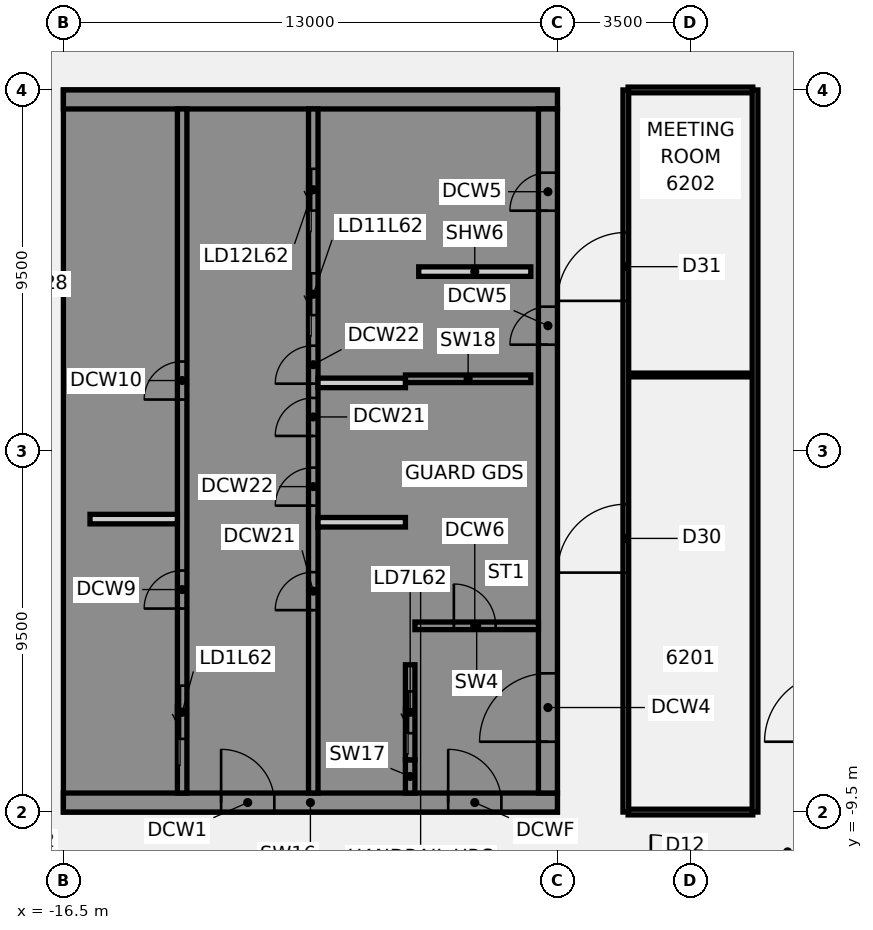
"""IFC4 building model, lengths in metres.
Left out: names, types, materials, properties, quantities, classifications, styles, units other than length and angle.
Written with IfcOpenShell. Run it as: python <this file> out.ifc"""

import sys

from ifc_helpers import new_model, si_unit, direction, frame, frame_2d, origin, place, context, subcontext, project, spatial, polyline, rectangle, outline, extrude, element, fill, save


model = new_model("IFC4")
c1 = context("Model", 3, precision=1e-05, world=origin(), true_north=direction((0.0, 1.0)))
c2 = subcontext(c1, "Body", "Model", "MODEL_VIEW")
j1 = project(units=[si_unit("LENGTHUNIT", "METRE"), si_unit("PLANEANGLEUNIT", "RADIAN")], contexts=[c1])
p1 = place(None, origin())
s1 = spatial("IfcSite", under=j1, at=p1, CompositionType="ELEMENT")
p2 = place(p1, origin())
s2 = spatial("IfcBuilding", under=s1, at=p2, CompositionType="ELEMENT")
p3 = place(p2, frame((0.0, 0.0, 245.1)))
s3 = spatial("IfcBuildingStorey", under=s2, at=p3, CompositionType="ELEMENT", Elevation=245.1)
p4 = place(p3, frame((-1.64, -9.5, 0.0), z_axis=(0.0, 0.0, 1.0), x_axis=(1.0, 0.0, 0.0)))
e1 = element("IfcWall", 1, at=p4, inside=s3, PredefinedType="PARTITIONING", context=c2, shape_type="SweptSolid", body=[
    extrude(rectangle(XDim=3.28, YDim=0.15, at=frame_2d((1.64, 0.0))), origin(), (0.0, 0.0, 1.0), 2.864),
])
p5 = place(p3, frame((-1.64, 2.0, 0.0), z_axis=(0.0, 0.0, 1.0), x_axis=(1.0, 0.0, 0.0)))
e2 = element("IfcWall", 2, at=p5, inside=s3, PredefinedType="PARTITIONING", context=c2, shape_type="SweptSolid", body=[
    extrude(rectangle(XDim=3.28, YDim=0.1, at=frame_2d((1.64, 0.0))), origin(), (0.0, 0.0, 1.0), 2.864),
])
p6 = place(p3, frame((-1.64, 9.5, 0.0), z_axis=(0.0, 0.0, 1.0), x_axis=(1.0, 0.0, 0.0)))
e3 = element("IfcWall", 3, at=p6, inside=s3, PredefinedType="PARTITIONING", context=c2, shape_type="SweptSolid", body=[
    extrude(rectangle(XDim=3.28, YDim=0.15, at=frame_2d((1.64, 0.0))), origin(), (0.0, 0.0, 1.0), 2.864),
])
p7 = place(p3, frame((-1.7, -9.5, 0.0), z_axis=(0.0, 0.0, 1.0), x_axis=(0.0, 1.0, 0.0)))
e4 = element("IfcWall", 4, at=p7, inside=s3, PredefinedType="PARTITIONING", context=c2, shape_type="SweptSolid", body=[
    extrude(rectangle(XDim=19.0, YDim=0.15, at=frame_2d((9.5, 0.0))), origin(), (0.0, 0.0, 1.0), 2.864),
])
p8 = place(p7, frame((6.3, 0.0, 0.0)))
e5 = element("IfcOpeningElement", 5, at=p8, cuts=e4, PredefinedType="OPENING", context=c2, shape_type="SweptSolid", body=[
    extrude(rectangle(XDim=1.8, YDim=2.1, at=frame_2d((0.9, 1.05))), frame((0.0, 0.085, 0.0), z_axis=(0.0, -1.0, 0.0), x_axis=(1.0, 0.0, 0.0)), (0.0, 0.0, 1.0), 0.17),
])
p9 = place(p7, frame((13.45, 0.0, 0.0)))
e6 = element("IfcOpeningElement", 6, at=p9, cuts=e4, PredefinedType="OPENING", context=c2, shape_type="SweptSolid", body=[
    extrude(rectangle(XDim=1.8, YDim=2.1, at=frame_2d((0.9, 1.05))), frame((0.0, 0.085, 0.0), z_axis=(0.0, -1.0, 0.0), x_axis=(1.0, 0.0, 0.0)), (0.0, 0.0, 1.0), 0.17),
])
p10 = place(p3, frame((1.7, -9.5, 0.0), z_axis=(0.0, 0.0, 1.0), x_axis=(0.0, 1.0, 0.0)))
e7 = element("IfcWall", 7, at=p10, inside=s3, PredefinedType="PARTITIONING", context=c2, shape_type="SweptSolid", body=[
    extrude(rectangle(XDim=19.0, YDim=0.15, at=frame_2d((9.5, 0.0))), origin(), (0.0, 0.0, 1.0), 2.864),
])
p11 = place(p3, frame((-16.5, -9.25, 0.0), z_axis=(0.0, 0.0, 1.0), x_axis=(1.0, 0.0, 0.0)))
e8 = element("IfcWall", 8, at=p11, inside=s3, PredefinedType="SHEAR", context=c2, shape_type="SweptSolid", body=[
    extrude(rectangle(XDim=13.0, YDim=0.5, at=frame_2d((6.5, 0.0))), origin(), (0.0, 0.0, 1.0), 3.46),
])
p12 = place(p11, frame((4.15, 0.0, 0.0)))
e9 = element("IfcOpeningElement", 9, at=p12, cuts=e8, PredefinedType="OPENING", context=c2, shape_type="SweptSolid", body=[
    extrude(rectangle(XDim=1.4, YDim=2.1, at=frame_2d((0.7, 1.05))), frame((0.0, 0.26, 0.0), z_axis=(0.0, -1.0, 0.0), x_axis=(1.0, 0.0, 0.0)), (0.0, 0.0, 1.0), 0.52),
])
p13 = place(p11, frame((10.125, 0.0, 0.0)))
e10 = element("IfcOpeningElement", 10, at=p13, cuts=e8, PredefinedType="OPENING", context=c2, shape_type="SweptSolid", body=[
    extrude(rectangle(XDim=1.4, YDim=2.1, at=frame_2d((0.7, 1.05))), frame((0.0, 0.26, 0.0), z_axis=(0.0, -1.0, 0.0), x_axis=(1.0, 0.0, 0.0)), (0.0, 0.0, 1.0), 0.52),
])
p14 = place(p3, origin())
e11 = element("IfcWall", 11, at=p14, inside=s3, PredefinedType="SHEAR", context=c2, shape_type="SweptSolid", body=[
    extrude(outline(polyline([(-13.5, -8.125), (-16.0, -8.125), (-16.0, -5.625), (-13.5, -5.625), (-13.5, -5.375), (-16.0, -5.375), (-16.0, 5.375), (-13.5, 5.375), (-13.5, 5.625), (-16.0, 5.625), (-16.0, 8.125), (-13.5, 8.125), (-13.5, 9.0), (-16.0, 9.0), (-16.5, 9.0), (-16.5, -9.0), (-16.0, -9.0), (-13.5, -9.0), (-13.5, -8.125)])), origin(), (0.0, 0.0, 1.0), 3.46),
])
p15 = place(p3, frame((-16.5, 9.25, 0.0), z_axis=(0.0, 0.0, 1.0), x_axis=(1.0, 0.0, 0.0)))
e12 = element("IfcWall", 12, at=p15, inside=s3, PredefinedType="SHEAR", context=c2, shape_type="SweptSolid", body=[
    extrude(rectangle(XDim=13.0, YDim=0.5, at=frame_2d((6.5, 0.0))), origin(), (0.0, 0.0, 1.0), 3.46),
])
p16 = place(p3, origin())
e13 = element("IfcWall", 13, at=p16, inside=s3, PredefinedType="SHEAR", context=c2, shape_type="SweptSolid", body=[
    extrude(outline(polyline([(-9.8, -5.375), (-9.8, -5.625), (-7.5, -5.625), (-7.25, -5.625), (-7.25, 9.0), (-7.5, 9.0), (-9.8, 9.0), (-9.8, 8.125), (-7.5, 8.125), (-7.5, 5.625), (-9.8, 5.625), (-9.8, 5.375), (-7.5, 5.375), (-7.5, 2.875), (-9.8, 2.875), (-9.8, 2.625), (-7.5, 2.625), (-7.5, -5.375), (-9.8, -5.375)])), origin(), (0.0, 0.0, 1.0), 3.46),
])
p17 = place(p3, origin())
e14 = element("IfcWall", 14, at=p17, inside=s3, PredefinedType="SHEAR", context=c2, shape_type="SweptSolid", body=[
    extrude(outline(polyline([(-7.5, -8.125), (-9.55, -8.125), (-9.55, -5.625), (-9.8, -5.625), (-9.8, -8.125), (-9.8, -9.0), (-7.5, -9.0), (-7.5, -8.125)])), origin(), (0.0, 0.0, 1.0), 3.46),
])
p18 = place(p3, frame((-7.375, -9.0, 0.0), z_axis=(0.0, 0.0, 1.0), x_axis=(0.0, 1.0, 0.0)))
e15 = element("IfcWall", 15, at=p18, inside=s3, PredefinedType="SHEAR", context=c2, shape_type="SweptSolid", body=[
    extrude(rectangle(XDim=0.875, YDim=0.25, at=frame_2d((0.438, 0.0))), origin(), (0.0, 0.0, 1.0), 3.46),
])
p19 = place(p3, frame((-7.5, 1.9, 0.0), z_axis=(0.0, 0.0, 1.0), x_axis=(1.0, 0.0, 0.0)))
e16 = element("IfcWall", 16, at=p19, inside=s3, PredefinedType="SHEAR", context=c2, shape_type="SweptSolid", body=[
    extrude(rectangle(XDim=3.3, YDim=0.2, at=frame_2d((1.65, 0.0))), origin(), (0.0, 0.0, 1.0), 3.46),
])
p20 = place(p3, frame((-13.375, -9.0, 0.0), z_axis=(0.0, 0.0, 1.0), x_axis=(0.0, 1.0, 0.0)))
e17 = element("IfcWall", 17, at=p20, inside=s3, PredefinedType="SHEAR", context=c2, shape_type="SweptSolid", body=[
    extrude(rectangle(XDim=18.0, YDim=0.25, at=frame_2d((9.0, 0.0))), origin(), (0.0, 0.0, 1.0), 3.46),
])
p21 = place(p20, frame((1.425, 0.0, 0.0)))
e18 = element("IfcOpeningElement", 18, at=p21, cuts=e17, PredefinedType="OPENING", context=c2, shape_type="SweptSolid", body=[
    extrude(rectangle(XDim=1.4, YDim=2.1, at=frame_2d((0.7, 1.05))), frame((0.0, 0.135, 0.0), z_axis=(0.0, -1.0, 0.0), x_axis=(1.0, 0.0, 0.0)), (0.0, 0.0, 1.0), 0.27),
])
p22 = place(p20, frame((4.854, 0.0, 0.0)))
e19 = element("IfcOpeningElement", 19, at=p22, cuts=e17, PredefinedType="OPENING", context=c2, shape_type="SweptSolid", body=[
    extrude(rectangle(XDim=1.0, YDim=2.1, at=frame_2d((0.5, 1.05))), frame((0.0, 0.135, 0.0), z_axis=(0.0, -1.0, 0.0), x_axis=(1.0, 0.0, 0.0)), (0.0, 0.0, 1.0), 0.27),
])
p23 = place(p20, frame((10.354, 0.0, 0.0)))
e20 = element("IfcOpeningElement", 20, at=p23, cuts=e17, PredefinedType="OPENING", context=c2, shape_type="SweptSolid", body=[
    extrude(rectangle(XDim=1.0, YDim=2.1, at=frame_2d((0.5, 1.05))), frame((0.0, 0.135, 0.0), z_axis=(0.0, -1.0, 0.0), x_axis=(1.0, 0.0, 0.0)), (0.0, 0.0, 1.0), 0.27),
])
p24 = place(p3, frame((-9.925, -9.0, 0.0), z_axis=(0.0, 0.0, 1.0), x_axis=(0.0, 1.0, 0.0)))
e21 = element("IfcWall", 21, at=p24, inside=s3, PredefinedType="SHEAR", context=c2, shape_type="SweptSolid", body=[
    extrude(rectangle(XDim=18.0, YDim=0.25, at=frame_2d((9.0, 0.0))), origin(), (0.0, 0.0, 1.0), 3.46),
])
p25 = place(p24, frame((12.575, 0.0, 0.0)))
e22 = element("IfcOpeningElement", 22, at=p25, cuts=e21, PredefinedType="OPENING", context=c2, shape_type="SweptSolid", body=[
    extrude(rectangle(XDim=1.1, YDim=2.1, at=frame_2d((0.55, 1.05))), frame((0.0, 0.135, 0.0), z_axis=(0.0, -1.0, 0.0), x_axis=(1.0, 0.0, 0.0)), (0.0, 0.0, 1.0), 0.27),
])
p26 = place(p24, frame((15.325, 0.0, 0.0)))
e23 = element("IfcOpeningElement", 23, at=p26, cuts=e21, PredefinedType="OPENING", context=c2, shape_type="SweptSolid", body=[
    extrude(rectangle(XDim=1.1, YDim=2.1, at=frame_2d((0.55, 1.05))), frame((0.0, 0.135, 0.0), z_axis=(0.0, -1.0, 0.0), x_axis=(1.0, 0.0, 0.0)), (0.0, 0.0, 1.0), 0.27),
])
p27 = place(p24, frame((4.812, 0.0, 0.0)))
e24 = element("IfcOpeningElement", 24, at=p27, cuts=e21, PredefinedType="OPENING", context=c2, shape_type="SweptSolid", body=[
    extrude(rectangle(XDim=1.0, YDim=2.1, at=frame_2d((0.5, 1.05))), frame((0.0, 0.135, 0.0), z_axis=(0.0, -1.0, 0.0), x_axis=(1.0, 0.0, 0.0)), (0.0, 0.0, 1.0), 0.27),
])
p28 = place(p24, frame((7.562, 0.0, 0.0)))
e25 = element("IfcOpeningElement", 25, at=p28, cuts=e21, PredefinedType="OPENING", context=c2, shape_type="SweptSolid", body=[
    extrude(rectangle(XDim=1.0, YDim=2.1, at=frame_2d((0.5, 1.05))), frame((0.0, 0.135, 0.0), z_axis=(0.0, -1.0, 0.0), x_axis=(1.0, 0.0, 0.0)), (0.0, 0.0, 1.0), 0.27),
])
p29 = place(p24, frame((9.396, 0.0, 0.0)))
e26 = element("IfcOpeningElement", 26, at=p29, cuts=e21, PredefinedType="OPENING", context=c2, shape_type="SweptSolid", body=[
    extrude(rectangle(XDim=1.0, YDim=2.1, at=frame_2d((0.5, 1.05))), frame((0.0, 0.135, 0.0), z_axis=(0.0, -1.0, 0.0), x_axis=(1.0, 0.0, 0.0)), (0.0, 0.0, 1.0), 0.27),
])
p30 = place(p24, frame((10.771, 0.0, 0.0)))
e27 = element("IfcOpeningElement", 27, at=p30, cuts=e21, PredefinedType="OPENING", context=c2, shape_type="SweptSolid", body=[
    extrude(rectangle(XDim=1.0, YDim=2.1, at=frame_2d((0.5, 1.05))), frame((0.0, 0.135, 0.0), z_axis=(0.0, -1.0, 0.0), x_axis=(1.0, 0.0, 0.0)), (0.0, 0.0, 1.0), 0.27),
])
p31 = place(p3, frame((-7.375, -8.125, 0.0), z_axis=(0.0, 0.0, 1.0), x_axis=(0.0, 1.0, 0.0)))
e28 = element("IfcWall", 28, at=p31, inside=s3, PredefinedType="SHEAR", context=c2, shape_type="SweptSolid", body=[
    extrude(rectangle(XDim=2.5, YDim=0.25, at=frame_2d((1.25, 0.0))), origin(), (0.0, 0.0, 1.0), 3.46),
])
p32 = place(p31, frame((0.7, 0.0, 0.0)))
e29 = element("IfcOpeningElement", 29, at=p32, cuts=e28, PredefinedType="OPENING", context=c2, shape_type="SweptSolid", body=[
    extrude(rectangle(XDim=1.1, YDim=2.1, at=frame_2d((0.55, 1.05))), frame((0.0, 0.135, 0.0), z_axis=(0.0, -1.0, 0.0), x_axis=(1.0, 0.0, 0.0)), (0.0, 0.0, 1.0), 0.27),
])
p33 = place(p3, frame((-3.75, -9.0, 0.0), z_axis=(0.0, 0.0, 1.0), x_axis=(0.0, 1.0, 0.0)))
e30 = element("IfcWall", 30, at=p33, inside=s3, PredefinedType="SHEAR", context=c2, shape_type="SweptSolid", body=[
    extrude(rectangle(XDim=18.0, YDim=0.5, at=frame_2d((9.0, 0.0))), origin(), (0.0, 0.0, 1.0), 3.46),
])
p34 = place(p33, frame((1.35, 0.0, 0.0)))
e31 = element("IfcOpeningElement", 31, at=p34, cuts=e30, PredefinedType="OPENING", context=c2, shape_type="SweptSolid", body=[
    extrude(rectangle(XDim=1.8, YDim=2.1, at=frame_2d((0.9, 1.05))), frame((0.0, 0.26, 0.0), z_axis=(0.0, -1.0, 0.0), x_axis=(1.0, 0.0, 0.0)), (0.0, 0.0, 1.0), 0.52),
])
p35 = place(p33, frame((11.798, 0.0, 0.0)))
e32 = element("IfcOpeningElement", 32, at=p35, cuts=e30, PredefinedType="OPENING", context=c2, shape_type="SweptSolid", body=[
    extrude(rectangle(XDim=1.0, YDim=2.1, at=frame_2d((0.5, 1.05))), frame((0.0, 0.26, 0.0), z_axis=(0.0, -1.0, 0.0), x_axis=(1.0, 0.0, 0.0)), (0.0, 0.0, 1.0), 0.52),
])
p36 = place(p33, frame((15.323, 0.0, 0.0)))
e33 = element("IfcOpeningElement", 33, at=p36, cuts=e30, PredefinedType="OPENING", context=c2, shape_type="SweptSolid", body=[
    extrude(rectangle(XDim=1.0, YDim=2.1, at=frame_2d((0.5, 1.05))), frame((0.0, 0.26, 0.0), z_axis=(0.0, -1.0, 0.0), x_axis=(1.0, 0.0, 0.0)), (0.0, 0.0, 1.0), 0.52),
])
p37 = place(p3, frame((-7.15, 4.72, 0.0), z_axis=(0.0, 0.0, 1.0), x_axis=(1.0, 0.0, 0.0)))
e34 = element("IfcWall", 34, at=p37, inside=s3, PredefinedType="PARTITIONING", context=c2, shape_type="SweptSolid", body=[
    extrude(rectangle(XDim=2.95, YDim=0.25, at=frame_2d((1.475, 0.0))), origin(), (0.0, 0.0, 1.0), 3.46),
])
p38 = place(p3, frame((-7.25, -4.6, 0.0), z_axis=(0.0, 0.0, 1.0), x_axis=(1.0, 0.0, 0.0)))
e35 = element("IfcWall", 35, at=p38, inside=s3, PredefinedType="SHEAR", context=c2, shape_type="SweptSolid", body=[
    extrude(rectangle(XDim=3.25, YDim=0.2, at=frame_2d((1.625, 0.0))), origin(), (0.0, 0.0, 1.0), 3.46),
])
p39 = place(p38, frame((1.025, 0.0, 0.0)))
e36 = element("IfcOpeningElement", 36, at=p39, cuts=e35, PredefinedType="OPENING", context=c2, shape_type="SweptSolid", body=[
    extrude(rectangle(XDim=1.1, YDim=2.1, at=frame_2d((0.55, 1.05))), frame((0.0, 0.11, 0.0), z_axis=(0.0, -1.0, 0.0), x_axis=(1.0, 0.0, 0.0)), (0.0, 0.0, 1.0), 0.22),
])
for number, where, z_axis, x_axis in (
    (37, (-15.8, -1.792, 0.0), (0.0, 0.0, 1.0), (1.0, 0.0, 0.0)),
    (38, (-9.8, -1.875, 0.0), (0.0, 0.0, 1.0), (1.0, 0.0, 0.0)),
    (39, (-9.8, 1.792, 0.0), (0.0, 0.0, 1.0), (1.0, 0.0, 0.0)),
):
    element("IfcWall", number, at=place(p3, frame(where, z_axis=z_axis, x_axis=x_axis)), inside=s3, PredefinedType="PARTITIONING", context=c2, shape_type="SweptSolid", body=[
        extrude(rectangle(XDim=2.3, YDim=0.25, at=frame_2d((1.15, 0.0))), origin(), (0.0, 0.0, 1.0), 3.46),
    ])
p40 = place(p8, frame((1.8, 0.0, 0.0), z_axis=(0.0, 0.0, 1.0), x_axis=(-1.0, 0.0, 0.0)))
e40 = element("IfcDoor", 40, at=p40, inside=s3, OperationType="DOUBLE_DOOR_SINGLE_SWING", PredefinedType="DOOR", context=c2, shape_type="SweptSolid", body=[
    extrude(rectangle(XDim=1.8, YDim=2.1, at=frame_2d((0.9, 1.05))), frame((0.0, 0.025, 0.0), z_axis=(0.0, -1.0, 0.0), x_axis=(1.0, 0.0, 0.0)), (0.0, 0.0, 1.0), 0.05),
])
fill(e5, e40)
p41 = place(p9, frame((1.8, 0.0, 0.0), z_axis=(0.0, 0.0, 1.0), x_axis=(-1.0, 0.0, 0.0)))
e41 = element("IfcDoor", 41, at=p41, inside=s3, OperationType="DOUBLE_DOOR_SINGLE_SWING", PredefinedType="DOOR", context=c2, shape_type="SweptSolid", body=[
    extrude(rectangle(XDim=1.8, YDim=2.1, at=frame_2d((0.9, 1.05))), frame((0.0, 0.025, 0.0), z_axis=(0.0, -1.0, 0.0), x_axis=(1.0, 0.0, 0.0)), (0.0, 0.0, 1.0), 0.05),
])
fill(e6, e41)
p42 = place(p12, origin())
e42 = element("IfcDoor", 42, at=p42, inside=s3, OperationType="SINGLE_SWING_LEFT", PredefinedType="DOOR", context=c2, shape_type="SweptSolid", body=[
    extrude(rectangle(XDim=1.4, YDim=2.1, at=frame_2d((0.7, 1.05))), frame((0.0, 0.025, 0.0), z_axis=(0.0, -1.0, 0.0), x_axis=(1.0, 0.0, 0.0)), (0.0, 0.0, 1.0), 0.05),
])
fill(e9, e42)
p43 = place(p13, origin())
e43 = element("IfcDoor", 43, at=p43, inside=s3, OperationType="SINGLE_SWING_LEFT", PredefinedType="DOOR", context=c2, shape_type="SweptSolid", body=[
    extrude(rectangle(XDim=1.4, YDim=2.1, at=frame_2d((0.7, 1.05))), frame((0.0, 0.025, 0.0), z_axis=(0.0, -1.0, 0.0), x_axis=(1.0, 0.0, 0.0)), (0.0, 0.0, 1.0), 0.05),
])
fill(e10, e43)
p44 = place(p34, origin())
e44 = element("IfcDoor", 44, at=p44, inside=s3, OperationType="SINGLE_SWING_LEFT", PredefinedType="DOOR", context=c2, shape_type="SweptSolid", body=[
    extrude(rectangle(XDim=1.8, YDim=2.1, at=frame_2d((0.9, 1.05))), frame((0.0, 0.025, 0.0), z_axis=(0.0, -1.0, 0.0), x_axis=(1.0, 0.0, 0.0)), (0.0, 0.0, 1.0), 0.05),
])
fill(e31, e44)
p45 = place(p35, origin())
e45 = element("IfcDoor", 45, at=p45, inside=s3, OperationType="SINGLE_SWING_LEFT", PredefinedType="DOOR", context=c2, shape_type="SweptSolid", body=[
    extrude(rectangle(XDim=1.0, YDim=2.1, at=frame_2d((0.5, 1.05))), frame((0.0, 0.225, 0.0), z_axis=(0.0, -1.0, 0.0), x_axis=(1.0, 0.0, 0.0)), (0.0, 0.0, 1.0), 0.05),
])
fill(e32, e45)
p46 = place(p36, origin())
e46 = element("IfcDoor", 46, at=p46, inside=s3, OperationType="SINGLE_SWING_LEFT", PredefinedType="DOOR", context=c2, shape_type="SweptSolid", body=[
    extrude(rectangle(XDim=1.0, YDim=2.1, at=frame_2d((0.5, 1.05))), frame((0.0, 0.225, 0.0), z_axis=(0.0, -1.0, 0.0), x_axis=(1.0, 0.0, 0.0)), (0.0, 0.0, 1.0), 0.05),
])
fill(e33, e46)
p47 = place(p39, origin())
e47 = element("IfcDoor", 47, at=p47, inside=s3, OperationType="SINGLE_SWING_LEFT", PredefinedType="DOOR", context=c2, shape_type="SweptSolid", body=[
    extrude(rectangle(XDim=1.1, YDim=2.1, at=frame_2d((0.55, 1.05))), frame((0.0, 0.025, 0.0), z_axis=(0.0, -1.0, 0.0), x_axis=(1.0, 0.0, 0.0)), (0.0, 0.0, 1.0), 0.05),
])
fill(e36, e47)
p48 = place(p21, origin())
e48 = element("IfcDoor", 48, at=p48, inside=s3, OperationType="SLIDING_TO_LEFT", PredefinedType="DOOR", context=c2, shape_type="SweptSolid", body=[
    extrude(rectangle(XDim=1.4, YDim=2.1, at=frame_2d((0.7, 1.05))), frame((0.0, 0.025, 0.0), z_axis=(0.0, -1.0, 0.0), x_axis=(1.0, 0.0, 0.0)), (0.0, 0.0, 1.0), 0.05),
])
fill(e18, e48)
p49 = place(p32, origin())
e49 = element("IfcDoor", 49, at=p49, inside=s3, OperationType="SLIDING_TO_LEFT", PredefinedType="DOOR", context=c2, shape_type="SweptSolid", body=[
    extrude(rectangle(XDim=1.1, YDim=2.1, at=frame_2d((0.55, 1.05))), frame((0.0, 0.025, 0.0), z_axis=(0.0, -1.0, 0.0), x_axis=(1.0, 0.0, 0.0)), (0.0, 0.0, 1.0), 0.05),
])
fill(e29, e49)
p50 = place(p25, origin())
e50 = element("IfcDoor", 50, at=p50, inside=s3, OperationType="SLIDING_TO_LEFT", PredefinedType="DOOR", context=c2, shape_type="SweptSolid", body=[
    extrude(rectangle(XDim=1.1, YDim=2.1, at=frame_2d((0.55, 1.05))), frame((0.0, 0.025, 0.0), z_axis=(0.0, -1.0, 0.0), x_axis=(1.0, 0.0, 0.0)), (0.0, 0.0, 1.0), 0.05),
])
fill(e22, e50)
p51 = place(p26, origin())
e51 = element("IfcDoor", 51, at=p51, inside=s3, OperationType="SLIDING_TO_LEFT", PredefinedType="DOOR", context=c2, shape_type="SweptSolid", body=[
    extrude(rectangle(XDim=1.1, YDim=2.1, at=frame_2d((0.55, 1.05))), frame((0.0, 0.025, 0.0), z_axis=(0.0, -1.0, 0.0), x_axis=(1.0, 0.0, 0.0)), (0.0, 0.0, 1.0), 0.05),
])
fill(e23, e51)
p52 = place(p22, origin())
e52 = element("IfcDoor", 52, at=p52, inside=s3, OperationType="SINGLE_SWING_LEFT", PredefinedType="DOOR", context=c2, shape_type="SweptSolid", body=[
    extrude(rectangle(XDim=1.0, YDim=2.1, at=frame_2d((0.5, 1.05))), frame((0.0, 0.025, 0.0), z_axis=(0.0, -1.0, 0.0), x_axis=(1.0, 0.0, 0.0)), (0.0, 0.0, 1.0), 0.05),
])
fill(e19, e52)
p53 = place(p23, origin())
e53 = element("IfcDoor", 53, at=p53, inside=s3, OperationType="SINGLE_SWING_LEFT", PredefinedType="DOOR", context=c2, shape_type="SweptSolid", body=[
    extrude(rectangle(XDim=1.0, YDim=2.1, at=frame_2d((0.5, 1.05))), frame((0.0, 0.025, 0.0), z_axis=(0.0, -1.0, 0.0), x_axis=(1.0, 0.0, 0.0)), (0.0, 0.0, 1.0), 0.05),
])
fill(e20, e53)
p54 = place(p27, origin())
e54 = element("IfcDoor", 54, at=p54, inside=s3, OperationType="SINGLE_SWING_LEFT", PredefinedType="DOOR", context=c2, shape_type="SweptSolid", body=[
    extrude(rectangle(XDim=1.0, YDim=2.1, at=frame_2d((0.5, 1.05))), frame((0.0, 0.025, 0.0), z_axis=(0.0, -1.0, 0.0), x_axis=(1.0, 0.0, 0.0)), (0.0, 0.0, 1.0), 0.05),
])
fill(e24, e54)
p55 = place(p28, origin())
e55 = element("IfcDoor", 55, at=p55, inside=s3, OperationType="SINGLE_SWING_LEFT", PredefinedType="DOOR", context=c2, shape_type="SweptSolid", body=[
    extrude(rectangle(XDim=1.0, YDim=2.1, at=frame_2d((0.5, 1.05))), frame((0.0, 0.025, 0.0), z_axis=(0.0, -1.0, 0.0), x_axis=(1.0, 0.0, 0.0)), (0.0, 0.0, 1.0), 0.05),
])
fill(e25, e55)
p56 = place(p29, origin())
e56 = element("IfcDoor", 56, at=p56, inside=s3, OperationType="SINGLE_SWING_LEFT", PredefinedType="DOOR", context=c2, shape_type="SweptSolid", body=[
    extrude(rectangle(XDim=1.0, YDim=2.1, at=frame_2d((0.5, 1.05))), frame((0.0, 0.025, 0.0), z_axis=(0.0, -1.0, 0.0), x_axis=(1.0, 0.0, 0.0)), (0.0, 0.0, 1.0), 0.05),
])
fill(e26, e56)
p57 = place(p30, origin())
e57 = element("IfcDoor", 57, at=p57, inside=s3, OperationType="SINGLE_SWING_LEFT", PredefinedType="DOOR", context=c2, shape_type="SweptSolid", body=[
    extrude(rectangle(XDim=1.0, YDim=2.1, at=frame_2d((0.5, 1.05))), frame((0.0, 0.025, 0.0), z_axis=(0.0, -1.0, 0.0), x_axis=(1.0, 0.0, 0.0)), (0.0, 0.0, 1.0), 0.05),
])
fill(e27, e57)
save(model, sys.argv[1])
